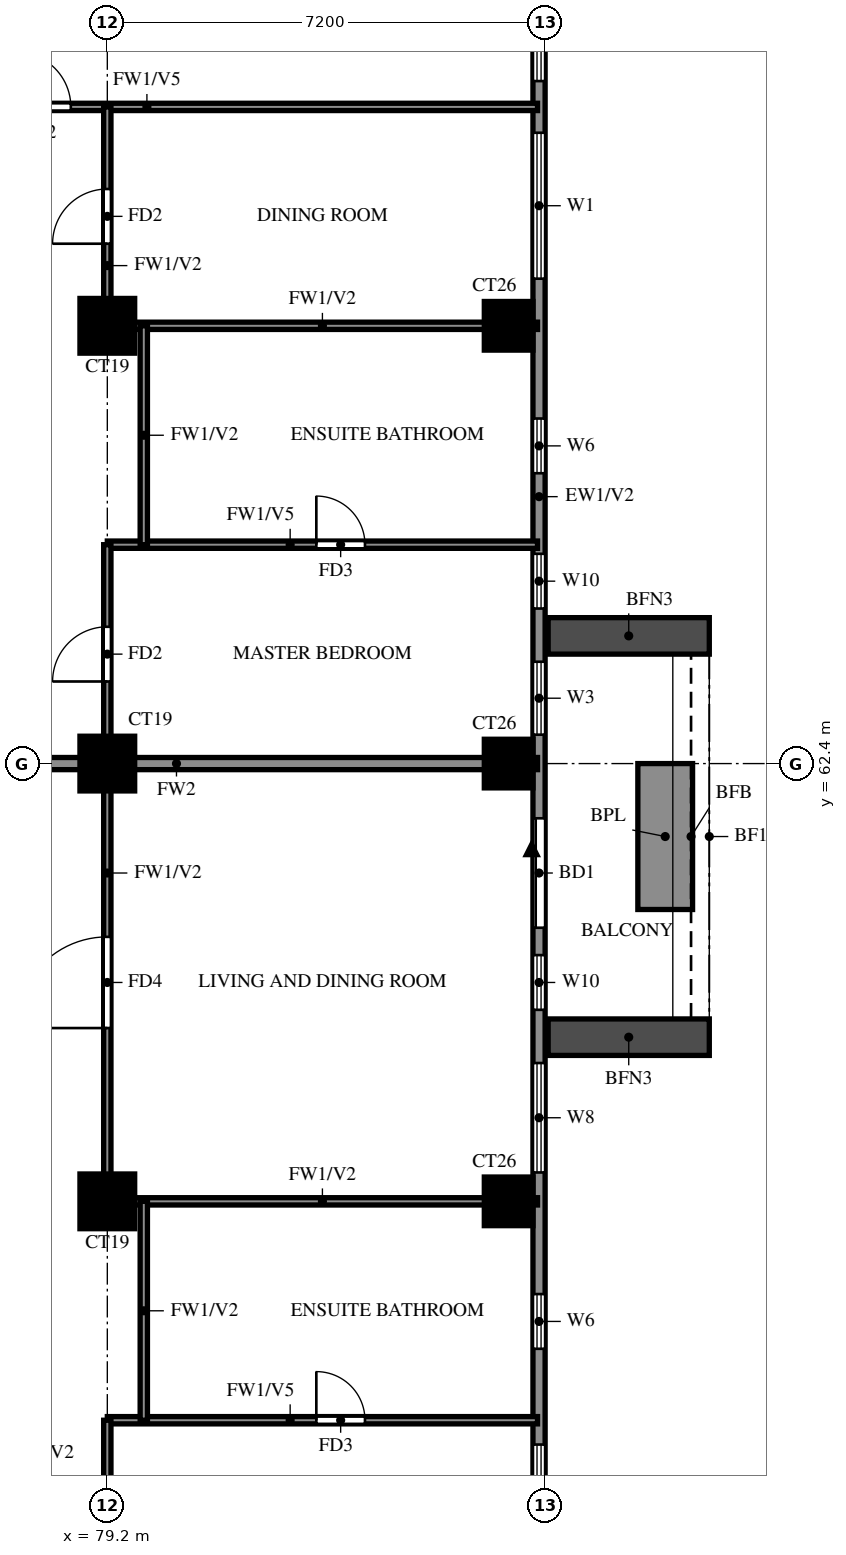
"""IFC4 building model, lengths in metres.
Left out: names, types, materials, properties, quantities, classifications, styles, units other than length and angle.
Written with IfcOpenShell. Run it as: python <this file> out.ifc"""

import sys

from ifc_helpers import new_model, si_unit, direction, frame, frame_2d, origin, origin_2d, place, context, subcontext, project, spatial, rectangle, extrude, source, transform, mapped, element, fill, save


model = new_model("IFC4")
c1 = context("Model", 3, precision=1e-05, world=origin(), true_north=direction((0.0, 1.0)))
c2 = subcontext(c1, "Body", "Model", "MODEL_VIEW")
j1 = project(units=[si_unit("LENGTHUNIT", "METRE"), si_unit("PLANEANGLEUNIT", "RADIAN")], contexts=[c1])
p1 = place(None, origin())
s1 = spatial("IfcSite", under=j1, at=p1, CompositionType="ELEMENT")
p2 = place(p1, origin())
s2 = spatial("IfcBuilding", under=s1, at=p2, CompositionType="ELEMENT")
p3 = place(p2, frame((0.0, 0.0, 199.0)))
s3 = spatial("IfcBuildingStorey", under=s2, at=p3, CompositionType="ELEMENT", Elevation=199.0)
m1 = source(origin(), c2, "Body", "SweptSolid", [
    extrude(rectangle(XDim=0.9, YDim=0.9, at=origin_2d()), origin(), (0.0, 0.0, 1.0), 3.2),
])
p4 = place(p3, frame((79.2, 55.2, 0.0), z_axis=(0.0, 0.0, 1.0), x_axis=(1.0, 0.0, 0.0)))
e1 = element("IfcColumn", 1, at=p4, inside=s3, PredefinedType="COLUMN", context=c2, shape_type="MappedRepresentation", body=[
    mapped(m1, transform((0.0, 0.0, 0.0))),
])
m2 = source(origin(), c2, "Body", "SweptSolid", [
    extrude(rectangle(XDim=0.8, YDim=0.8, at=origin_2d()), origin(), (0.0, 0.0, 1.0), 3.2),
])
p5 = place(p3, frame((85.8, 55.2, 0.0), z_axis=(0.0, 0.0, 1.0), x_axis=(1.0, 0.0, 0.0)))
e2 = element("IfcColumn", 2, at=p5, inside=s3, PredefinedType="COLUMN", context=c2, shape_type="MappedRepresentation", body=[
    mapped(m2, transform((0.0, 0.0, 0.0))),
])
p6 = place(p3, frame((79.2, 62.4, 0.0), z_axis=(0.0, 0.0, 1.0), x_axis=(1.0, 0.0, 0.0)))
e3 = element("IfcColumn", 3, at=p6, inside=s3, PredefinedType="COLUMN", context=c2, shape_type="MappedRepresentation", body=[
    mapped(m1, transform((0.0, 0.0, 0.0))),
])
p7 = place(p3, frame((85.8, 62.4, 0.0), z_axis=(0.0, 0.0, 1.0), x_axis=(1.0, 0.0, 0.0)))
e4 = element("IfcColumn", 4, at=p7, inside=s3, PredefinedType="COLUMN", context=c2, shape_type="MappedRepresentation", body=[
    mapped(m2, transform((0.0, 0.0, 0.0))),
])
p8 = place(p3, frame((79.2, 69.6, 0.0), z_axis=(0.0, 0.0, 1.0), x_axis=(1.0, 0.0, 0.0)))
e5 = element("IfcColumn", 5, at=p8, inside=s3, PredefinedType="COLUMN", context=c2, shape_type="MappedRepresentation", body=[
    mapped(m1, transform((0.0, 0.0, 0.0))),
])
p9 = place(p3, frame((85.8, 69.6, 0.0), z_axis=(0.0, 0.0, 1.0), x_axis=(1.0, 0.0, 0.0)))
e6 = element("IfcColumn", 6, at=p9, inside=s3, PredefinedType="COLUMN", context=c2, shape_type="MappedRepresentation", body=[
    mapped(m2, transform((0.0, 0.0, 0.0))),
])
p10 = place(p3, frame((86.3, 48.2, 0.0), z_axis=(0.0, 0.0, 1.0), x_axis=(0.0, 1.0, 0.0)))
e7 = element("IfcWall", 7, at=p10, inside=s3, PredefinedType="SOLIDWALL", context=c2, shape_type="SweptSolid", body=[
    extrude(rectangle(XDim=28.6, YDim=0.2, at=frame_2d((14.3, 0.0))), origin(), (0.0, 0.0, 1.0), 3.2),
])
p11 = place(p10, frame((11.5, 0.0, 0.0)))
e8 = element("IfcOpeningElement", 8, at=p11, cuts=e7, PredefinedType="OPENING", context=c2, shape_type="SweptSolid", body=[
    extrude(rectangle(XDim=1.8, YDim=2.4, at=frame_2d((0.9, 1.2))), frame((0.0, 0.11, 0.0), z_axis=(0.0, -1.0, 0.0), x_axis=(1.0, 0.0, 0.0)), (0.0, 0.0, 1.0), 0.22),
])
p12 = place(p10, frame((0.6, 0.0, 0.6)))
e9 = element("IfcOpeningElement", 9, at=p12, cuts=e7, PredefinedType="OPENING", context=c2, shape_type="SweptSolid", body=[
    extrude(rectangle(XDim=2.4, YDim=2.4, at=frame_2d((1.2, 1.2))), frame((0.0, 0.11, 0.0), z_axis=(0.0, -1.0, 0.0), x_axis=(1.0, 0.0, 0.0)), (0.0, 0.0, 1.0), 0.22),
])
p13 = place(p10, frame((4.575, 0.0, 1.5)))
e10 = element("IfcOpeningElement", 10, at=p13, cuts=e7, PredefinedType="OPENING", context=c2, shape_type="SweptSolid", body=[
    extrude(rectangle(XDim=0.9, YDim=0.9, at=frame_2d((0.45, 0.45))), frame((0.0, 0.11, 0.0), z_axis=(0.0, -1.0, 0.0), x_axis=(1.0, 0.0, 0.0)), (0.0, 0.0, 1.0), 0.22),
])
p14 = place(p10, frame((7.475, 0.0, 0.6)))
e11 = element("IfcOpeningElement", 11, at=p14, cuts=e7, PredefinedType="OPENING", context=c2, shape_type="SweptSolid", body=[
    extrude(rectangle(XDim=1.8, YDim=2.4, at=frame_2d((0.9, 1.2))), frame((0.0, 0.11, 0.0), z_axis=(0.0, -1.0, 0.0), x_axis=(1.0, 0.0, 0.0)), (0.0, 0.0, 1.0), 0.22),
])
p15 = place(p10, frame((10.15, 0.0, 0.6)))
e12 = element("IfcOpeningElement", 12, at=p15, cuts=e7, PredefinedType="OPENING", context=c2, shape_type="SweptSolid", body=[
    extrude(rectangle(XDim=0.9, YDim=2.4, at=frame_2d((0.45, 1.2))), frame((0.0, 0.11, 0.0), z_axis=(0.0, -1.0, 0.0), x_axis=(1.0, 0.0, 0.0)), (0.0, 0.0, 1.0), 0.22),
])
p16 = place(p10, frame((14.675, 0.0, 0.6)))
e13 = element("IfcOpeningElement", 13, at=p16, cuts=e7, PredefinedType="OPENING", context=c2, shape_type="SweptSolid", body=[
    extrude(rectangle(XDim=1.2, YDim=2.4, at=frame_2d((0.6, 1.2))), frame((0.0, 0.11, 0.0), z_axis=(0.0, -1.0, 0.0), x_axis=(1.0, 0.0, 0.0)), (0.0, 0.0, 1.0), 0.22),
])
p17 = place(p10, frame((16.75, 0.0, 0.6)))
e14 = element("IfcOpeningElement", 14, at=p17, cuts=e7, PredefinedType="OPENING", context=c2, shape_type="SweptSolid", body=[
    extrude(rectangle(XDim=0.9, YDim=2.4, at=frame_2d((0.45, 1.2))), frame((0.0, 0.11, 0.0), z_axis=(0.0, -1.0, 0.0), x_axis=(1.0, 0.0, 0.0)), (0.0, 0.0, 1.0), 0.22),
])
p18 = place(p10, frame((18.975, 0.0, 1.5)))
e15 = element("IfcOpeningElement", 15, at=p18, cuts=e7, PredefinedType="OPENING", context=c2, shape_type="SweptSolid", body=[
    extrude(rectangle(XDim=0.9, YDim=0.9, at=frame_2d((0.45, 0.45))), frame((0.0, 0.11, 0.0), z_axis=(0.0, -1.0, 0.0), x_axis=(1.0, 0.0, 0.0)), (0.0, 0.0, 1.0), 0.22),
])
p19 = place(p10, frame((22.175, 0.0, 0.6)))
e16 = element("IfcOpeningElement", 16, at=p19, cuts=e7, PredefinedType="OPENING", context=c2, shape_type="SweptSolid", body=[
    extrude(rectangle(XDim=2.4, YDim=2.4, at=frame_2d((1.2, 1.2))), frame((0.0, 0.11, 0.0), z_axis=(0.0, -1.0, 0.0), x_axis=(1.0, 0.0, 0.0)), (0.0, 0.0, 1.0), 0.22),
])
p20 = place(p10, frame((25.425, 0.0, 0.6)))
e17 = element("IfcOpeningElement", 17, at=p20, cuts=e7, PredefinedType="OPENING", context=c2, shape_type="SweptSolid", body=[
    extrude(rectangle(XDim=2.4, YDim=2.4, at=frame_2d((1.2, 1.2))), frame((0.0, 0.11, 0.0), z_axis=(0.0, -1.0, 0.0), x_axis=(1.0, 0.0, 0.0)), (0.0, 0.0, 1.0), 0.22),
])
for number, where, z_axis, x_axis in (
    (18, (86.45, 57.9, 0.0), (0.0, 0.0, 1.0), (1.0, 0.0, 0.0)),
    (19, (86.45, 64.5, 0.0), (0.0, 0.0, 1.0), (1.0, 0.0, 0.0)),
):
    element("IfcWall", number, at=place(p3, frame(where, z_axis=z_axis, x_axis=x_axis)), inside=s3, PredefinedType="SOLIDWALL", context=c2, shape_type="SweptSolid", body=[
        extrude(rectangle(XDim=2.65, YDim=0.6, at=frame_2d((1.325, 0.0))), origin(), (0.0, 0.0, 1.0), 2.85),
    ])
p21 = place(p3, frame((88.375, 60.0, 0.0), z_axis=(0.0, 0.0, 1.0), x_axis=(0.0, 1.0, 0.0)))
e20 = element("IfcWall", 20, at=p21, inside=s3, PredefinedType="SOLIDWALL", context=c2, shape_type="SweptSolid", body=[
    extrude(rectangle(XDim=2.4, YDim=0.9, at=frame_2d((1.2, 0.0))), origin(), (0.0, 0.0, 1.0), 0.9),
])
p22 = place(p3, frame((74.4, 62.4, 0.0), z_axis=(0.0, 0.0, 1.0), x_axis=(1.0, 0.0, 0.0)))
e21 = element("IfcWall", 21, at=p22, inside=s3, PredefinedType="SOLIDWALL", context=c2, shape_type="SweptSolid", body=[
    extrude(rectangle(XDim=11.875, YDim=0.2, at=frame_2d((5.938, 0.0))), origin(), (0.0, 0.0, 1.0), 3.2),
])
p23 = place(p3, frame((79.2, 51.6, 0.0), z_axis=(0.0, 0.0, 1.0), x_axis=(1.0, 0.0, 0.0)))
e22 = element("IfcWall", 22, at=p23, inside=s3, PredefinedType="PARTITIONING", context=c2, shape_type="SweptSolid", body=[
    extrude(rectangle(XDim=7.075, YDim=0.12, at=frame_2d((3.538, 0.0))), origin(), (0.0, 0.0, 1.0), 2.3),
])
p24 = place(p23, frame((3.438, 0.0, 0.0)))
e23 = element("IfcOpeningElement", 23, at=p24, cuts=e22, PredefinedType="OPENING", context=c2, shape_type="SweptSolid", body=[
    extrude(rectangle(XDim=0.8, YDim=2.1, at=frame_2d((0.4, 1.05))), frame((0.0, 0.07, 0.0), z_axis=(0.0, -1.0, 0.0), x_axis=(1.0, 0.0, 0.0)), (0.0, 0.0, 1.0), 0.14),
])
p25 = place(p3, frame((79.2, 55.2, 0.0), z_axis=(0.0, 0.0, 1.0), x_axis=(1.0, 0.0, 0.0)))
e24 = element("IfcWall", 24, at=p25, inside=s3, PredefinedType="PARTITIONING", context=c2, shape_type="SweptSolid", body=[
    extrude(rectangle(XDim=7.075, YDim=0.12, at=frame_2d((3.538, 0.0))), origin(), (0.0, 0.0, 1.0), 3.2),
])
p26 = place(p3, frame((79.2, 66.0, 0.0), z_axis=(0.0, 0.0, 1.0), x_axis=(1.0, 0.0, 0.0)))
e25 = element("IfcWall", 25, at=p26, inside=s3, PredefinedType="PARTITIONING", context=c2, shape_type="SweptSolid", body=[
    extrude(rectangle(XDim=7.075, YDim=0.12, at=frame_2d((3.538, 0.0))), origin(), (0.0, 0.0, 1.0), 2.3),
])
p27 = place(p26, frame((3.438, 0.0, 0.0)))
e26 = element("IfcOpeningElement", 26, at=p27, cuts=e25, PredefinedType="OPENING", context=c2, shape_type="SweptSolid", body=[
    extrude(rectangle(XDim=0.8, YDim=2.1, at=frame_2d((0.4, 1.05))), frame((0.0, 0.07, 0.0), z_axis=(0.0, -1.0, 0.0), x_axis=(1.0, 0.0, 0.0)), (0.0, 0.0, 1.0), 0.14),
])
p28 = place(p3, frame((79.2, 69.6, 0.0), z_axis=(0.0, 0.0, 1.0), x_axis=(1.0, 0.0, 0.0)))
e27 = element("IfcWall", 27, at=p28, inside=s3, PredefinedType="PARTITIONING", context=c2, shape_type="SweptSolid", body=[
    extrude(rectangle(XDim=7.075, YDim=0.12, at=frame_2d((3.538, 0.0))), origin(), (0.0, 0.0, 1.0), 3.2),
])
p29 = place(p3, frame((72.0, 73.2, 0.0), z_axis=(0.0, 0.0, 1.0), x_axis=(1.0, 0.0, 0.0)))
e28 = element("IfcWall", 28, at=p29, inside=s3, PredefinedType="PARTITIONING", context=c2, shape_type="SweptSolid", body=[
    extrude(rectangle(XDim=14.275, YDim=0.12, at=frame_2d((7.137, 0.0))), origin(), (0.0, 0.0, 1.0), 2.3),
])
p30 = place(p29, frame((5.7, 0.0, 0.0)))
e29 = element("IfcOpeningElement", 29, at=p30, cuts=e28, PredefinedType="OPENING", context=c2, shape_type="SweptSolid", body=[
    extrude(rectangle(XDim=0.9, YDim=2.1, at=frame_2d((0.45, 1.05))), frame((0.0, 0.07, 0.0), z_axis=(0.0, -1.0, 0.0), x_axis=(1.0, 0.0, 0.0)), (0.0, 0.0, 1.0), 0.14),
])
p31 = place(p3, frame((79.2, 48.125, 0.0), z_axis=(0.0, 0.0, 1.0), x_axis=(0.0, 1.0, 0.0)))
e30 = element("IfcWall", 30, at=p31, inside=s3, PredefinedType="PARTITIONING", context=c2, shape_type="SweptSolid", body=[
    extrude(rectangle(XDim=3.475, YDim=0.12, at=frame_2d((1.738, 0.0))), origin(), (0.0, 0.0, 1.0), 3.2),
])
p32 = place(p31, frame((1.288, 0.0, 0.0)))
e31 = element("IfcOpeningElement", 31, at=p32, cuts=e30, PredefinedType="OPENING", context=c2, shape_type="SweptSolid", body=[
    extrude(rectangle(XDim=0.9, YDim=2.1, at=frame_2d((0.45, 1.05))), frame((0.0, 0.07, 0.0), z_axis=(0.0, -1.0, 0.0), x_axis=(1.0, 0.0, 0.0)), (0.0, 0.0, 1.0), 0.14),
])
p33 = place(p3, frame((79.2, 55.2, 0.0), z_axis=(0.0, 0.0, 1.0), x_axis=(0.0, 1.0, 0.0)))
e32 = element("IfcWall", 32, at=p33, inside=s3, PredefinedType="PARTITIONING", context=c2, shape_type="SweptSolid", body=[
    extrude(rectangle(XDim=10.8, YDim=0.12, at=frame_2d((5.4, 0.0))), origin(), (0.0, 0.0, 1.0), 3.2),
])
p34 = place(p33, frame((2.85, 0.0, 0.0)))
e33 = element("IfcOpeningElement", 33, at=p34, cuts=e32, PredefinedType="OPENING", context=c2, shape_type="SweptSolid", body=[
    extrude(rectangle(XDim=1.5, YDim=2.1, at=frame_2d((0.75, 1.05))), frame((0.0, 0.07, 0.0), z_axis=(0.0, -1.0, 0.0), x_axis=(1.0, 0.0, 0.0)), (0.0, 0.0, 1.0), 0.14),
])
p35 = place(p33, frame((8.55, 0.0, 0.0)))
e34 = element("IfcOpeningElement", 34, at=p35, cuts=e32, PredefinedType="OPENING", context=c2, shape_type="SweptSolid", body=[
    extrude(rectangle(XDim=0.9, YDim=2.1, at=frame_2d((0.45, 1.05))), frame((0.0, 0.07, 0.0), z_axis=(0.0, -1.0, 0.0), x_axis=(1.0, 0.0, 0.0)), (0.0, 0.0, 1.0), 0.14),
])
p36 = place(p3, frame((79.2, 69.6, 0.0), z_axis=(0.0, 0.0, 1.0), x_axis=(0.0, 1.0, 0.0)))
e35 = element("IfcWall", 35, at=p36, inside=s3, PredefinedType="PARTITIONING", context=c2, shape_type="SweptSolid", body=[
    extrude(rectangle(XDim=3.6, YDim=0.12, at=frame_2d((1.8, 0.0))), origin(), (0.0, 0.0, 1.0), 3.2),
])
p37 = place(p36, frame((1.35, 0.0, 0.0)))
e36 = element("IfcOpeningElement", 36, at=p37, cuts=e35, PredefinedType="OPENING", context=c2, shape_type="SweptSolid", body=[
    extrude(rectangle(XDim=0.9, YDim=2.1, at=frame_2d((0.45, 1.05))), frame((0.0, 0.07, 0.0), z_axis=(0.0, -1.0, 0.0), x_axis=(1.0, 0.0, 0.0)), (0.0, 0.0, 1.0), 0.14),
])
p38 = place(p3, frame((79.8, 51.6, 0.0), z_axis=(0.0, 0.0, 1.0), x_axis=(0.0, 1.0, 0.0)))
e37 = element("IfcWall", 37, at=p38, inside=s3, PredefinedType="PARTITIONING", context=c2, shape_type="SweptSolid", body=[
    extrude(rectangle(XDim=3.6, YDim=0.12, at=frame_2d((1.8, 0.0))), origin(), (0.0, 0.0, 1.0), 3.2),
])
p39 = place(p3, frame((79.8, 66.0, 0.0), z_axis=(0.0, 0.0, 1.0), x_axis=(0.0, 1.0, 0.0)))
e38 = element("IfcWall", 38, at=p39, inside=s3, PredefinedType="PARTITIONING", context=c2, shape_type="SweptSolid", body=[
    extrude(rectangle(XDim=3.6, YDim=0.12, at=frame_2d((1.8, 0.0))), origin(), (0.0, 0.0, 1.0), 3.2),
])
p40 = place(p11, origin())
e39 = element("IfcDoor", 39, at=p40, inside=s3, OperationType="DOUBLE_DOOR_SLIDING", PredefinedType="DOOR", context=c2, shape_type="SweptSolid", body=[
    extrude(rectangle(XDim=1.8, YDim=2.4, at=frame_2d((0.9, 1.2))), frame((0.0, 0.025, 0.0), z_axis=(0.0, -1.0, 0.0), x_axis=(1.0, 0.0, 0.0)), (0.0, 0.0, 1.0), 0.05),
])
fill(e8, e39)
p41 = place(p12, origin())
e40 = element("IfcWindow", 40, at=p41, inside=s3, PartitioningType="DOUBLE_PANEL_VERTICAL", PredefinedType="WINDOW", context=c2, shape_type="SweptSolid", body=[
    extrude(rectangle(XDim=2.4, YDim=2.4, at=frame_2d((1.2, 1.2))), frame((0.0, 0.03, 0.0), z_axis=(0.0, -1.0, 0.0), x_axis=(1.0, 0.0, 0.0)), (0.0, 0.0, 1.0), 0.06),
])
fill(e9, e40)
p42 = place(p13, origin())
e41 = element("IfcWindow", 41, at=p42, inside=s3, PartitioningType="SINGLE_PANEL", PredefinedType="WINDOW", context=c2, shape_type="SweptSolid", body=[
    extrude(rectangle(XDim=0.9, YDim=0.9, at=frame_2d((0.45, 0.45))), frame((0.0, 0.03, 0.0), z_axis=(0.0, -1.0, 0.0), x_axis=(1.0, 0.0, 0.0)), (0.0, 0.0, 1.0), 0.06),
])
fill(e10, e41)
p43 = place(p14, origin())
e42 = element("IfcWindow", 42, at=p43, inside=s3, PartitioningType="DOUBLE_PANEL_VERTICAL", PredefinedType="WINDOW", context=c2, shape_type="SweptSolid", body=[
    extrude(rectangle(XDim=1.8, YDim=2.4, at=frame_2d((0.9, 1.2))), frame((0.0, 0.03, 0.0), z_axis=(0.0, -1.0, 0.0), x_axis=(1.0, 0.0, 0.0)), (0.0, 0.0, 1.0), 0.06),
])
fill(e11, e42)
p44 = place(p15, origin())
e43 = element("IfcWindow", 43, at=p44, inside=s3, PartitioningType="SINGLE_PANEL", PredefinedType="WINDOW", context=c2, shape_type="SweptSolid", body=[
    extrude(rectangle(XDim=0.9, YDim=2.4, at=frame_2d((0.45, 1.2))), frame((0.0, 0.03, 0.0), z_axis=(0.0, -1.0, 0.0), x_axis=(1.0, 0.0, 0.0)), (0.0, 0.0, 1.0), 0.06),
])
fill(e12, e43)
p45 = place(p16, origin())
e44 = element("IfcWindow", 44, at=p45, inside=s3, PartitioningType="SINGLE_PANEL", PredefinedType="WINDOW", context=c2, shape_type="SweptSolid", body=[
    extrude(rectangle(XDim=1.2, YDim=2.4, at=frame_2d((0.6, 1.2))), frame((0.0, 0.03, 0.0), z_axis=(0.0, -1.0, 0.0), x_axis=(1.0, 0.0, 0.0)), (0.0, 0.0, 1.0), 0.06),
])
fill(e13, e44)
p46 = place(p17, origin())
e45 = element("IfcWindow", 45, at=p46, inside=s3, PartitioningType="SINGLE_PANEL", PredefinedType="WINDOW", context=c2, shape_type="SweptSolid", body=[
    extrude(rectangle(XDim=0.9, YDim=2.4, at=frame_2d((0.45, 1.2))), frame((0.0, 0.03, 0.0), z_axis=(0.0, -1.0, 0.0), x_axis=(1.0, 0.0, 0.0)), (0.0, 0.0, 1.0), 0.06),
])
fill(e14, e45)
p47 = place(p18, origin())
e46 = element("IfcWindow", 46, at=p47, inside=s3, PartitioningType="SINGLE_PANEL", PredefinedType="WINDOW", context=c2, shape_type="SweptSolid", body=[
    extrude(rectangle(XDim=0.9, YDim=0.9, at=frame_2d((0.45, 0.45))), frame((0.0, 0.03, 0.0), z_axis=(0.0, -1.0, 0.0), x_axis=(1.0, 0.0, 0.0)), (0.0, 0.0, 1.0), 0.06),
])
fill(e15, e46)
p48 = place(p19, origin())
e47 = element("IfcWindow", 47, at=p48, inside=s3, PartitioningType="DOUBLE_PANEL_VERTICAL", PredefinedType="WINDOW", context=c2, shape_type="SweptSolid", body=[
    extrude(rectangle(XDim=2.4, YDim=2.4, at=frame_2d((1.2, 1.2))), frame((0.0, 0.03, 0.0), z_axis=(0.0, -1.0, 0.0), x_axis=(1.0, 0.0, 0.0)), (0.0, 0.0, 1.0), 0.06),
])
fill(e16, e47)
p49 = place(p20, origin())
e48 = element("IfcWindow", 48, at=p49, inside=s3, PartitioningType="DOUBLE_PANEL_VERTICAL", PredefinedType="WINDOW", context=c2, shape_type="SweptSolid", body=[
    extrude(rectangle(XDim=2.4, YDim=2.4, at=frame_2d((1.2, 1.2))), frame((0.0, 0.03, 0.0), z_axis=(0.0, -1.0, 0.0), x_axis=(1.0, 0.0, 0.0)), (0.0, 0.0, 1.0), 0.06),
])
fill(e17, e48)
p50 = place(p24, origin())
e49 = element("IfcDoor", 49, at=p50, inside=s3, OperationType="SINGLE_SWING_LEFT", PredefinedType="DOOR", context=c2, shape_type="SweptSolid", body=[
    extrude(rectangle(XDim=0.8, YDim=2.1, at=frame_2d((0.4, 1.05))), frame((0.0, 0.025, 0.0), z_axis=(0.0, -1.0, 0.0), x_axis=(1.0, 0.0, 0.0)), (0.0, 0.0, 1.0), 0.05),
])
fill(e23, e49)
p51 = place(p34, origin())
e50 = element("IfcDoor", 50, at=p51, inside=s3, OperationType="SINGLE_SWING_LEFT", PredefinedType="DOOR", context=c2, shape_type="SweptSolid", body=[
    extrude(rectangle(XDim=1.5, YDim=2.1, at=frame_2d((0.75, 1.05))), frame((0.0, 0.025, 0.0), z_axis=(0.0, -1.0, 0.0), x_axis=(1.0, 0.0, 0.0)), (0.0, 0.0, 1.0), 0.05),
])
fill(e33, e50)
p52 = place(p35, origin())
e51 = element("IfcDoor", 51, at=p52, inside=s3, OperationType="SINGLE_SWING_LEFT", PredefinedType="DOOR", context=c2, shape_type="SweptSolid", body=[
    extrude(rectangle(XDim=0.9, YDim=2.1, at=frame_2d((0.45, 1.05))), frame((0.0, 0.025, 0.0), z_axis=(0.0, -1.0, 0.0), x_axis=(1.0, 0.0, 0.0)), (0.0, 0.0, 1.0), 0.05),
])
fill(e34, e51)
p53 = place(p27, origin())
e52 = element("IfcDoor", 52, at=p53, inside=s3, OperationType="SINGLE_SWING_RIGHT", PredefinedType="DOOR", context=c2, shape_type="SweptSolid", body=[
    extrude(rectangle(XDim=0.8, YDim=2.1, at=frame_2d((0.4, 1.05))), frame((0.0, 0.025, 0.0), z_axis=(0.0, -1.0, 0.0), x_axis=(1.0, 0.0, 0.0)), (0.0, 0.0, 1.0), 0.05),
])
fill(e26, e52)
p54 = place(p37, origin())
e53 = element("IfcDoor", 53, at=p54, inside=s3, OperationType="SINGLE_SWING_LEFT", PredefinedType="DOOR", context=c2, shape_type="SweptSolid", body=[
    extrude(rectangle(XDim=0.9, YDim=2.1, at=frame_2d((0.45, 1.05))), frame((0.0, 0.025, 0.0), z_axis=(0.0, -1.0, 0.0), x_axis=(1.0, 0.0, 0.0)), (0.0, 0.0, 1.0), 0.05),
])
fill(e36, e53)
p55 = place(p30, origin())
e54 = element("IfcDoor", 54, at=p55, inside=s3, OperationType="SINGLE_SWING_LEFT", PredefinedType="DOOR", context=c2, shape_type="SweptSolid", body=[
    extrude(rectangle(XDim=0.9, YDim=2.1, at=frame_2d((0.45, 1.05))), frame((0.0, 0.025, 0.0), z_axis=(0.0, -1.0, 0.0), x_axis=(1.0, 0.0, 0.0)), (0.0, 0.0, 1.0), 0.05),
])
fill(e29, e54)
save(model, sys.argv[1])
